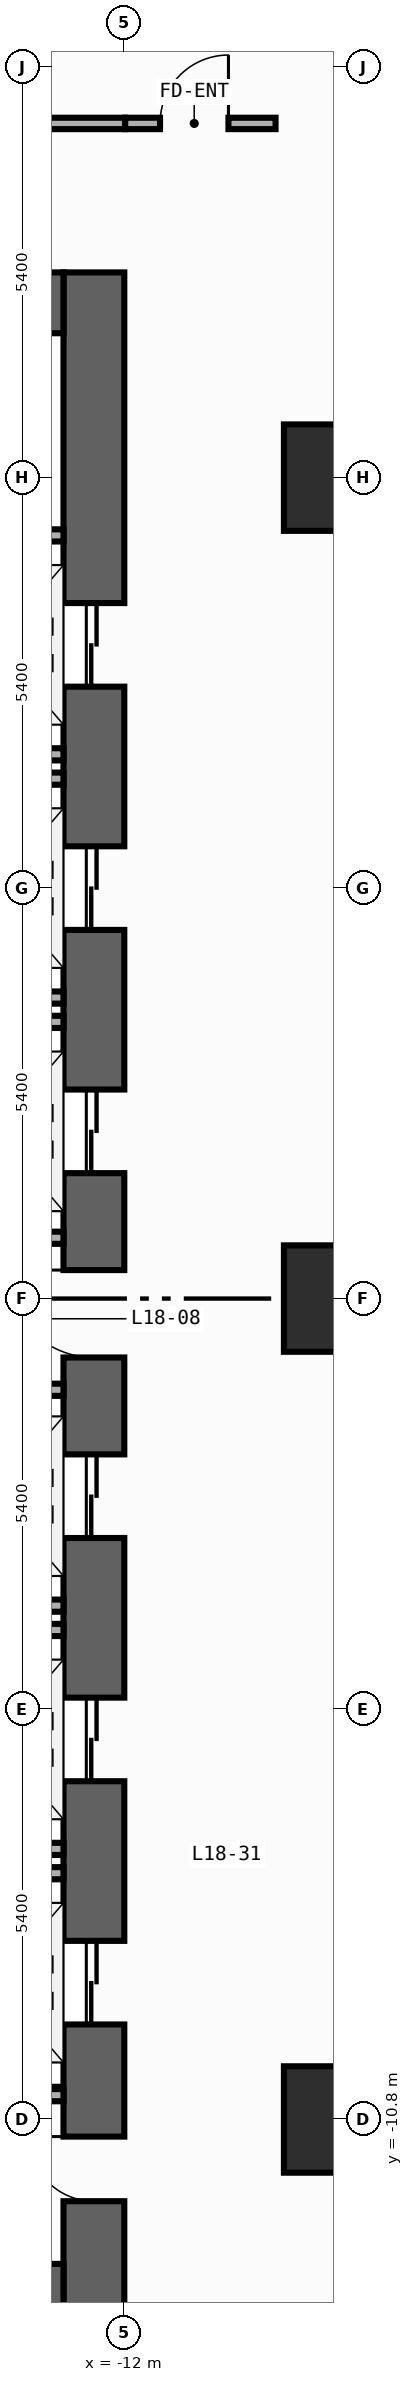
"""IFC4 building model, lengths in metres.
Left out: names, types, materials, properties, quantities, classifications, styles, units other than length and angle.
Written with IfcOpenShell. Run it as: python <this file> out.ifc"""

import sys

from ifc_helpers import new_model, si_unit, direction, frame, frame_2d, origin, origin_2d, place, context, subcontext, project, spatial, rectangle, extrude, element, fill, save


model = new_model("IFC4")
c1 = context("Model", 3, precision=1e-05, world=origin(), true_north=direction((0.0, 1.0)))
c2 = subcontext(c1, "Body", "Model", "MODEL_VIEW")
j1 = project(units=[si_unit("LENGTHUNIT", "METRE"), si_unit("PLANEANGLEUNIT", "RADIAN")], contexts=[c1])
p1 = place(None, origin())
s1 = spatial("IfcSite", under=j1, at=p1, CompositionType="ELEMENT")
p2 = place(p1, origin())
s2 = spatial("IfcBuilding", under=s1, at=p2, CompositionType="ELEMENT")
p3 = place(p2, frame((0.0, 0.0, 76.4)))
s3 = spatial("IfcBuildingStorey", under=s2, at=p3, CompositionType="ELEMENT", Elevation=76.4)
p4 = place(p3, frame((-12.4, -13.5, 0.0), z_axis=(0.0, 0.0, 1.0), x_axis=(0.0, 1.0, 0.0)))
e1 = element("IfcWall", 1, at=p4, inside=s3, PredefinedType="SHEAR", context=c2, shape_type="SweptSolid", body=[
    extrude(rectangle(XDim=27.0, YDim=0.8, at=frame_2d((13.5, 0.0))), origin(), (0.0, 0.0, 1.0), 3.94),
])
p5 = place(p4, frame((21.55, 0.0, 0.0)))
e2 = element("IfcOpeningElement", 2, at=p5, cuts=e1, PredefinedType="OPENING", context=c2, shape_type="SweptSolid", body=[
    extrude(rectangle(XDim=1.1, YDim=2.2, at=frame_2d((0.55, 1.1))), frame((0.0, 0.41, 0.0), z_axis=(0.0, -1.0, 0.0), x_axis=(1.0, 0.0, 0.0)), (0.0, 0.0, 1.0), 0.82),
])
p6 = place(p4, frame((18.35, 0.0, 0.0)))
e3 = element("IfcOpeningElement", 3, at=p6, cuts=e1, PredefinedType="OPENING", context=c2, shape_type="SweptSolid", body=[
    extrude(rectangle(XDim=1.1, YDim=2.2, at=frame_2d((0.55, 1.1))), frame((0.0, 0.41, 0.0), z_axis=(0.0, -1.0, 0.0), x_axis=(1.0, 0.0, 0.0)), (0.0, 0.0, 1.0), 0.82),
])
p7 = place(p4, frame((15.15, 0.0, 0.0)))
e4 = element("IfcOpeningElement", 4, at=p7, cuts=e1, PredefinedType="OPENING", context=c2, shape_type="SweptSolid", body=[
    extrude(rectangle(XDim=1.1, YDim=2.2, at=frame_2d((0.55, 1.1))), frame((0.0, 0.41, 0.0), z_axis=(0.0, -1.0, 0.0), x_axis=(1.0, 0.0, 0.0)), (0.0, 0.0, 1.0), 0.82),
])
p8 = place(p4, frame((10.35, 0.0, 0.0)))
e5 = element("IfcOpeningElement", 5, at=p8, cuts=e1, PredefinedType="OPENING", context=c2, shape_type="SweptSolid", body=[
    extrude(rectangle(XDim=1.1, YDim=2.2, at=frame_2d((0.55, 1.1))), frame((0.0, 0.41, 0.0), z_axis=(0.0, -1.0, 0.0), x_axis=(1.0, 0.0, 0.0)), (0.0, 0.0, 1.0), 0.82),
])
p9 = place(p4, frame((7.15, 0.0, 0.0)))
e6 = element("IfcOpeningElement", 6, at=p9, cuts=e1, PredefinedType="OPENING", context=c2, shape_type="SweptSolid", body=[
    extrude(rectangle(XDim=1.1, YDim=2.2, at=frame_2d((0.55, 1.1))), frame((0.0, 0.41, 0.0), z_axis=(0.0, -1.0, 0.0), x_axis=(1.0, 0.0, 0.0)), (0.0, 0.0, 1.0), 0.82),
])
p10 = place(p4, frame((3.95, 0.0, 0.0)))
e7 = element("IfcOpeningElement", 7, at=p10, cuts=e1, PredefinedType="OPENING", context=c2, shape_type="SweptSolid", body=[
    extrude(rectangle(XDim=1.1, YDim=2.2, at=frame_2d((0.55, 1.1))), frame((0.0, 0.41, 0.0), z_axis=(0.0, -1.0, 0.0), x_axis=(1.0, 0.0, 0.0)), (0.0, 0.0, 1.0), 0.82),
])
p11 = place(p4, frame((12.725, 0.0, 0.0)))
e8 = element("IfcOpeningElement", 8, at=p11, cuts=e1, PredefinedType="OPENING", context=c2, shape_type="SweptSolid", body=[
    extrude(rectangle(XDim=1.15, YDim=2.2, at=frame_2d((0.575, 1.1))), frame((0.0, 0.41, 0.0), z_axis=(0.0, -1.0, 0.0), x_axis=(1.0, 0.0, 0.0)), (0.0, 0.0, 1.0), 0.82),
])
p12 = place(p4, frame((1.625, 0.0, 0.0)))
e9 = element("IfcOpeningElement", 9, at=p12, cuts=e1, PredefinedType="OPENING", context=c2, shape_type="SweptSolid", body=[
    extrude(rectangle(XDim=0.85, YDim=2.1, at=frame_2d((0.425, 1.05))), frame((0.0, 0.41, 0.0), z_axis=(0.0, -1.0, 0.0), x_axis=(1.0, 0.0, 0.0)), (0.0, 0.0, 1.0), 0.82),
])
for number, where, z_axis, x_axis in (
    (10, (-19.6, -13.1, 0.0), (0.0, 0.0, 1.0), (1.0, 0.0, 0.0)),
    (11, (-19.6, 13.1, 0.0), (0.0, 0.0, 1.0), (1.0, 0.0, 0.0)),
):
    element("IfcWall", number, at=place(p3, frame(where, z_axis=z_axis, x_axis=x_axis)), inside=s3, PredefinedType="SHEAR", context=c2, shape_type="SweptSolid", body=[
        extrude(rectangle(XDim=6.8, YDim=0.8, at=frame_2d((3.4, 0.0))), origin(), (0.0, 0.0, 1.0), 3.94),
    ])
for number, where, z_axis, x_axis in (
    (12, (-9.2, -10.8, 0.0), (0.0, 0.0, 1.0), (1.0, 0.0, 0.0)),
    (13, (-9.2, 0.0, 0.0), (0.0, 0.0, 1.0), (1.0, 0.0, 0.0)),
    (14, (-9.2, 10.8, 0.0), (0.0, 0.0, 1.0), (1.0, 0.0, 0.0)),
):
    element("IfcColumn", number, at=place(p3, frame(where, z_axis=z_axis, x_axis=x_axis)), inside=s3, PredefinedType="COLUMN", context=c2, shape_type="SweptSolid", body=[
        extrude(rectangle(XDim=1.4, YDim=1.4, at=origin_2d()), origin(), (0.0, 0.0, 1.0), 4.2),
    ])
for number, where, z_axis, x_axis in (
    (15, (-14.99, 7.16, 0.0), (0.0, 0.0, 1.0), (1.0, 0.0, 0.0)),
    (16, (-14.99, 10.04, 0.0), (0.0, 0.0, 1.0), (1.0, 0.0, 0.0)),
    (17, (-14.99, 3.96, 0.0), (0.0, 0.0, 1.0), (1.0, 0.0, 0.0)),
    (18, (-14.99, 6.84, 0.0), (0.0, 0.0, 1.0), (1.0, 0.0, 0.0)),
    (19, (-14.99, 3.64, 0.0), (0.0, 0.0, 1.0), (1.0, 0.0, 0.0)),
    (20, (-14.99, -4.04, 0.0), (0.0, 0.0, 1.0), (1.0, 0.0, 0.0)),
    (21, (-14.99, -7.24, 0.0), (0.0, 0.0, 1.0), (1.0, 0.0, 0.0)),
    (22, (-14.99, -4.36, 0.0), (0.0, 0.0, 1.0), (1.0, 0.0, 0.0)),
    (23, (-14.99, -7.56, 0.0), (0.0, 0.0, 1.0), (1.0, 0.0, 0.0)),
):
    element("IfcWall", number, at=place(p3, frame(where, z_axis=z_axis, x_axis=x_axis)), inside=s3, PredefinedType="STANDARD", context=c2, shape_type="SweptSolid", body=[
        extrude(rectangle(XDim=2.19, YDim=0.16, at=frame_2d((1.095, 0.0))), origin(), (0.0, 0.0, 1.0), 3.94),
    ])
for number, where, z_axis, x_axis in (
    (24, (-15.4, 0.8, 0.0), (0.0, 0.0, 1.0), (1.0, 0.0, 0.0)),
    (25, (-15.4, -1.2, 0.0), (0.0, 0.0, 1.0), (1.0, 0.0, 0.0)),
    (26, (-15.4, -10.48, 0.0), (0.0, 0.0, 1.0), (1.0, 0.0, 0.0)),
):
    element("IfcWall", number, at=place(p3, frame(where, z_axis=z_axis, x_axis=x_axis)), inside=s3, PredefinedType="STANDARD", context=c2, shape_type="SweptSolid", body=[
        extrude(rectangle(XDim=2.6, YDim=0.16, at=frame_2d((1.3, 0.0))), origin(), (0.0, 0.0, 1.0), 3.94),
    ])
p13 = place(p3, frame((-11.99, 15.46, 0.0), z_axis=(0.0, 0.0, 1.0), x_axis=(1.0, 0.0, 0.0)))
e27 = element("IfcWall", 27, at=p13, inside=s3, PredefinedType="PARTITIONING", context=c2, shape_type="SweptSolid", body=[
    extrude(rectangle(XDim=1.98, YDim=0.15, at=frame_2d((0.99, 0.0))), origin(), (0.0, 0.0, 1.0), 3.94),
])
p14 = place(p13, frame((0.46, 0.0, 0.0)))
e28 = element("IfcOpeningElement", 28, at=p14, cuts=e27, PredefinedType="OPENING", context=c2, shape_type="SweptSolid", body=[
    extrude(rectangle(XDim=0.9, YDim=2.15, at=frame_2d((0.45, 1.075))), frame((0.0, 0.085, 0.0), z_axis=(0.0, -1.0, 0.0), x_axis=(1.0, 0.0, 0.0)), (0.0, 0.0, 1.0), 0.17),
])
p15 = place(p3, frame((-13.328, 15.46, 0.0), z_axis=(0.0, 0.0, 1.0), x_axis=(1.0, 0.0, 0.0)))
e29 = element("IfcWall", 29, at=p15, inside=s3, PredefinedType="PARTITIONING", context=c2, shape_type="SweptSolid", body=[
    extrude(rectangle(XDim=1.338, YDim=0.15, at=frame_2d((0.669, 0.0))), origin(), (0.0, 0.0, 1.0), 3.94),
])
p16 = place(p5, origin())
e30 = element("IfcDoor", 30, at=p16, inside=s3, OperationType="DOUBLE_DOOR_SLIDING", PredefinedType="DOOR", context=c2, shape_type="SweptSolid", body=[
    extrude(rectangle(XDim=1.1, YDim=2.2, at=frame_2d((0.55, 1.1))), frame((0.0, 0.025, 0.0), z_axis=(0.0, -1.0, 0.0), x_axis=(1.0, 0.0, 0.0)), (0.0, 0.0, 1.0), 0.05),
])
fill(e2, e30)
p17 = place(p6, origin())
e31 = element("IfcDoor", 31, at=p17, inside=s3, OperationType="DOUBLE_DOOR_SLIDING", PredefinedType="DOOR", context=c2, shape_type="SweptSolid", body=[
    extrude(rectangle(XDim=1.1, YDim=2.2, at=frame_2d((0.55, 1.1))), frame((0.0, 0.025, 0.0), z_axis=(0.0, -1.0, 0.0), x_axis=(1.0, 0.0, 0.0)), (0.0, 0.0, 1.0), 0.05),
])
fill(e3, e31)
p18 = place(p7, origin())
e32 = element("IfcDoor", 32, at=p18, inside=s3, OperationType="DOUBLE_DOOR_SLIDING", PredefinedType="DOOR", context=c2, shape_type="SweptSolid", body=[
    extrude(rectangle(XDim=1.1, YDim=2.2, at=frame_2d((0.55, 1.1))), frame((0.0, 0.025, 0.0), z_axis=(0.0, -1.0, 0.0), x_axis=(1.0, 0.0, 0.0)), (0.0, 0.0, 1.0), 0.05),
])
fill(e4, e32)
p19 = place(p8, origin())
e33 = element("IfcDoor", 33, at=p19, inside=s3, OperationType="DOUBLE_DOOR_SLIDING", PredefinedType="DOOR", context=c2, shape_type="SweptSolid", body=[
    extrude(rectangle(XDim=1.1, YDim=2.2, at=frame_2d((0.55, 1.1))), frame((0.0, 0.025, 0.0), z_axis=(0.0, -1.0, 0.0), x_axis=(1.0, 0.0, 0.0)), (0.0, 0.0, 1.0), 0.05),
])
fill(e5, e33)
p20 = place(p9, origin())
e34 = element("IfcDoor", 34, at=p20, inside=s3, OperationType="DOUBLE_DOOR_SLIDING", PredefinedType="DOOR", context=c2, shape_type="SweptSolid", body=[
    extrude(rectangle(XDim=1.1, YDim=2.2, at=frame_2d((0.55, 1.1))), frame((0.0, 0.025, 0.0), z_axis=(0.0, -1.0, 0.0), x_axis=(1.0, 0.0, 0.0)), (0.0, 0.0, 1.0), 0.05),
])
fill(e6, e34)
p21 = place(p10, origin())
e35 = element("IfcDoor", 35, at=p21, inside=s3, OperationType="DOUBLE_DOOR_SLIDING", PredefinedType="DOOR", context=c2, shape_type="SweptSolid", body=[
    extrude(rectangle(XDim=1.1, YDim=2.2, at=frame_2d((0.55, 1.1))), frame((0.0, 0.025, 0.0), z_axis=(0.0, -1.0, 0.0), x_axis=(1.0, 0.0, 0.0)), (0.0, 0.0, 1.0), 0.05),
])
fill(e7, e35)
p22 = place(p11, origin())
e36 = element("IfcDoor", 36, at=p22, inside=s3, OperationType="SINGLE_SWING_RIGHT", PredefinedType="DOOR", context=c2, shape_type="SweptSolid", body=[
    extrude(rectangle(XDim=1.15, YDim=2.2, at=frame_2d((0.575, 1.1))), frame((0.0, 0.025, 0.0), z_axis=(0.0, -1.0, 0.0), x_axis=(1.0, 0.0, 0.0)), (0.0, 0.0, 1.0), 0.05),
])
fill(e8, e36)
p23 = place(p12, origin())
e37 = element("IfcDoor", 37, at=p23, inside=s3, OperationType="SINGLE_SWING_RIGHT", PredefinedType="DOOR", context=c2, shape_type="SweptSolid", body=[
    extrude(rectangle(XDim=0.85, YDim=2.1, at=frame_2d((0.425, 1.05))), frame((0.0, 0.025, 0.0), z_axis=(0.0, -1.0, 0.0), x_axis=(1.0, 0.0, 0.0)), (0.0, 0.0, 1.0), 0.05),
])
fill(e9, e37)
p24 = place(p14, origin())
e38 = element("IfcDoor", 38, at=p24, inside=s3, OperationType="SINGLE_SWING_RIGHT", PredefinedType="DOOR", context=c2, shape_type="SweptSolid", body=[
    extrude(rectangle(XDim=0.9, YDim=2.15, at=frame_2d((0.45, 1.075))), frame((0.0, 0.025, 0.0), z_axis=(0.0, -1.0, 0.0), x_axis=(1.0, 0.0, 0.0)), (0.0, 0.0, 1.0), 0.05),
])
fill(e28, e38)
save(model, sys.argv[1])
